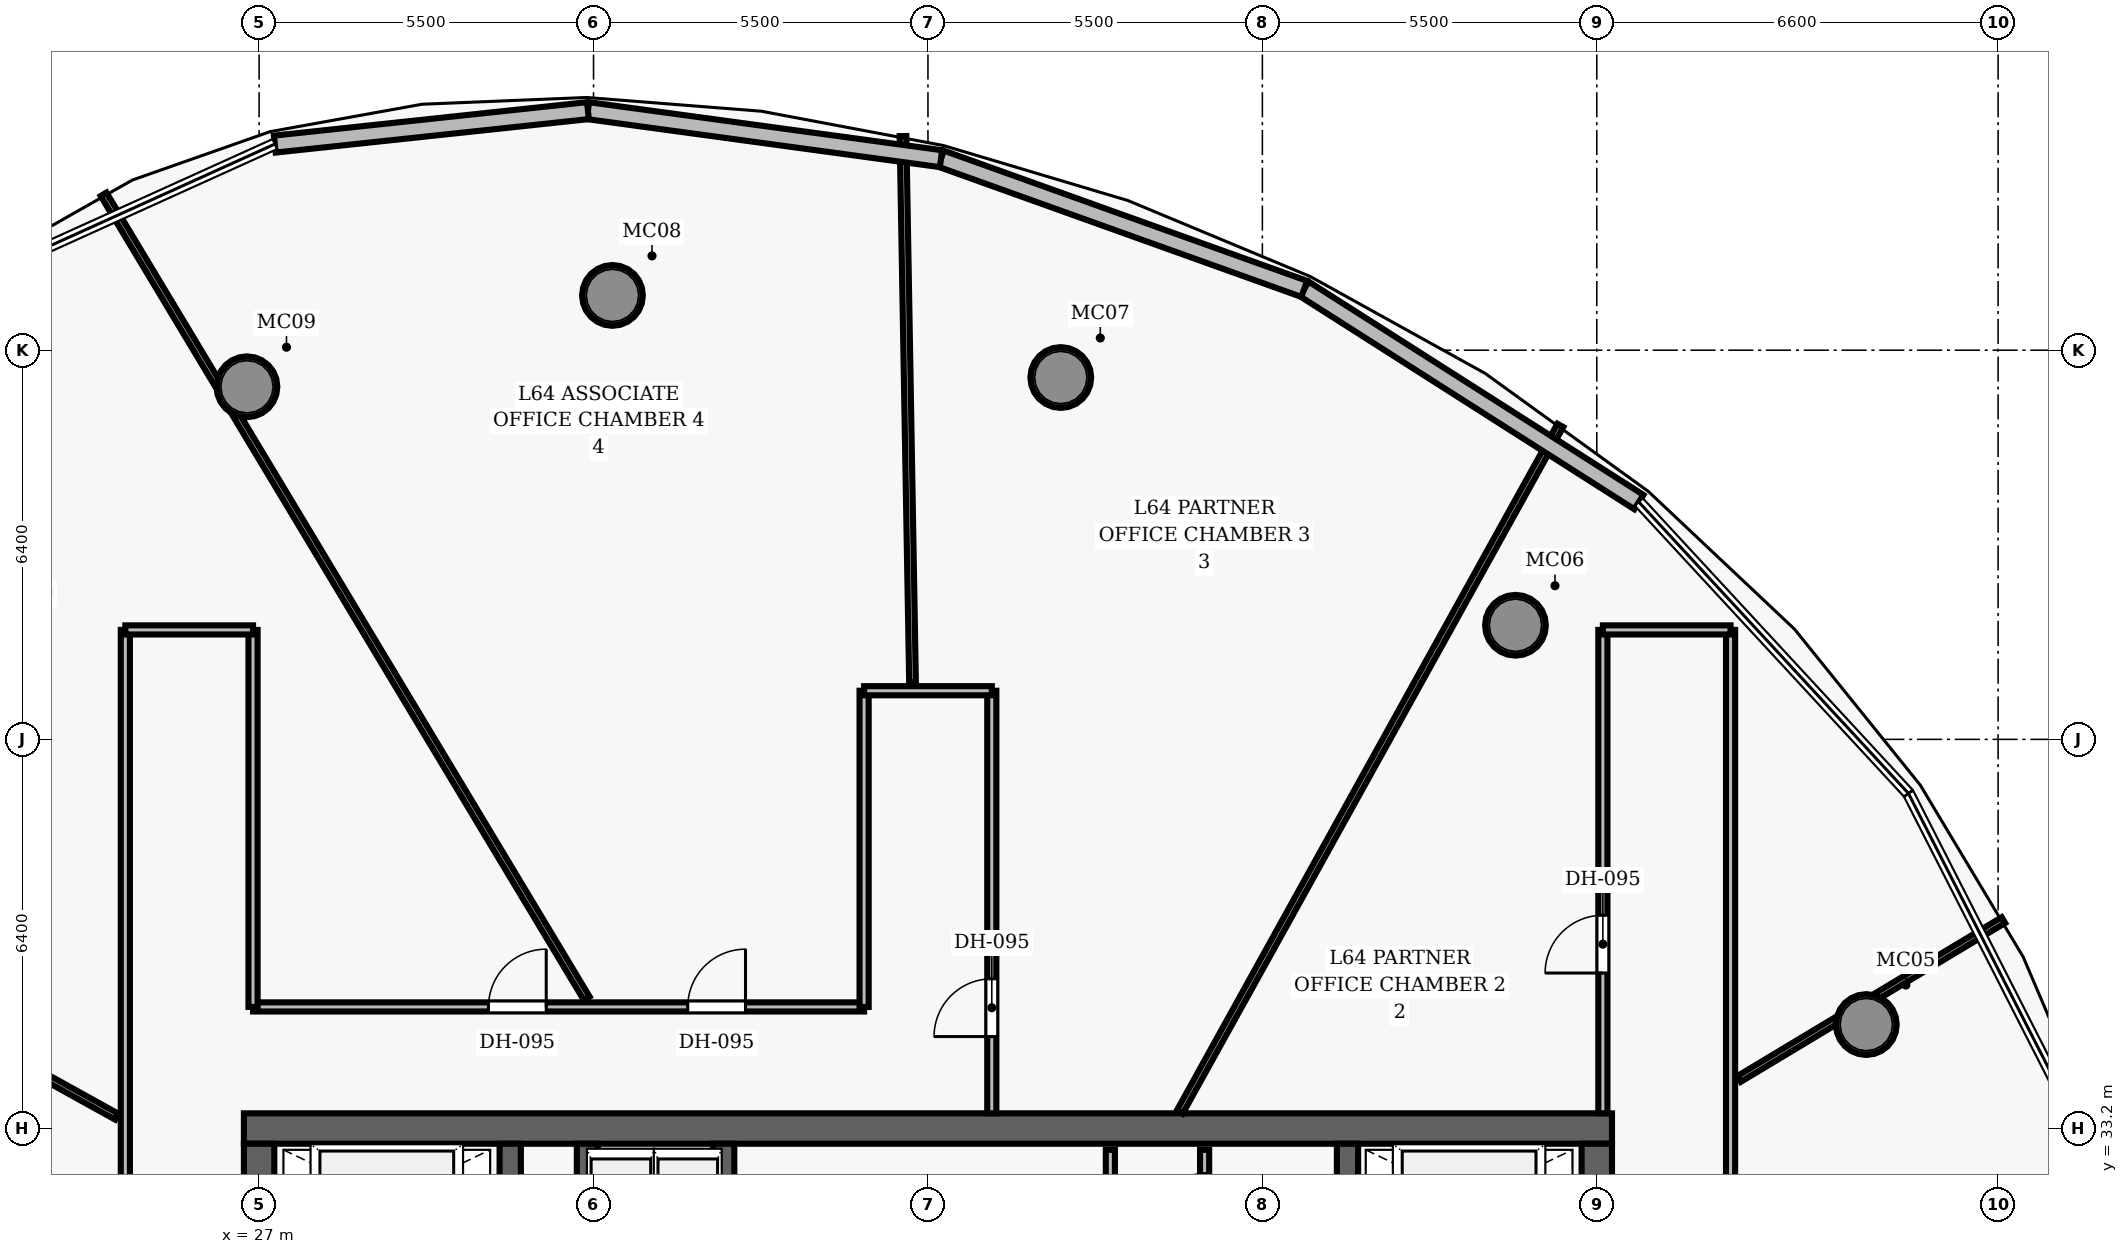
"""IFC4 building model, lengths in metres.
Left out: names, types, materials, properties, quantities, classifications, styles, units other than length and angle.
Written with IfcOpenShell. Run it as: python <this file> out.ifc"""

import sys

from ifc_helpers import new_model, si_unit, direction, frame, frame_2d, origin, origin_2d, place, context, subcontext, project, spatial, rectangle, hollow_circle, extrude, element, fill, save


model = new_model("IFC4")
c1 = context("Model", 3, precision=1e-05, world=origin(), true_north=direction((0.0, 1.0)))
c2 = subcontext(c1, "Body", "Model", "MODEL_VIEW")
j1 = project(units=[si_unit("LENGTHUNIT", "METRE"), si_unit("PLANEANGLEUNIT", "RADIAN")], contexts=[c1])
p1 = place(None, origin())
s1 = spatial("IfcSite", under=j1, at=p1, CompositionType="ELEMENT")
p2 = place(p1, origin())
s2 = spatial("IfcBuilding", under=s1, at=p2, CompositionType="ELEMENT")
p3 = place(p2, frame((0.0, 0.0, 253.6)))
s3 = spatial("IfcBuildingStorey", under=s2, at=p3, CompositionType="ELEMENT", Elevation=253.6)
p4 = place(p3, frame((26.75, 33.2, 0.0), z_axis=(0.0, 0.0, 1.0), x_axis=(1.0, 0.0, 0.0)))
e1 = element("IfcWall", 1, at=p4, inside=s3, PredefinedType="SHEAR", context=c2, shape_type="SweptSolid", body=[
    extrude(rectangle(XDim=22.5, YDim=0.5, at=frame_2d((11.25, 0.0))), origin(), (0.0, 0.0, 1.0), 3.85),
])
p5 = place(p3, frame((27.0, 19.05, 0.0), z_axis=(0.0, 0.0, 1.0), x_axis=(0.0, 1.0, 0.0)))
e2 = element("IfcWall", 2, at=p5, inside=s3, PredefinedType="SHEAR", context=c2, shape_type="SweptSolid", body=[
    extrude(rectangle(XDim=13.9, YDim=0.5, at=frame_2d((6.95, 0.0))), origin(), (0.0, 0.0, 1.0), 3.85),
])
p6 = place(p5, frame((8.2, 0.0, 0.0)))
e3 = element("IfcOpeningElement", 3, at=p6, cuts=e2, PredefinedType="OPENING", context=c2, shape_type="SweptSolid", body=[
    extrude(rectangle(XDim=1.05, YDim=2.15, at=frame_2d((0.525, 1.075))), frame((0.0, 0.26, 0.0), z_axis=(0.0, -1.0, 0.0), x_axis=(1.0, 0.0, 0.0)), (0.0, 0.0, 1.0), 0.52),
])
p7 = place(p3, frame((49.0, 19.05, 0.0), z_axis=(0.0, 0.0, 1.0), x_axis=(0.0, 1.0, 0.0)))
e4 = element("IfcWall", 4, at=p7, inside=s3, PredefinedType="SHEAR", context=c2, shape_type="SweptSolid", body=[
    extrude(rectangle(XDim=13.9, YDim=0.5, at=frame_2d((6.95, 0.0))), origin(), (0.0, 0.0, 1.0), 3.85),
])
p8 = place(p7, frame((8.2, 0.0, 0.0)))
e5 = element("IfcOpeningElement", 5, at=p8, cuts=e4, PredefinedType="OPENING", context=c2, shape_type="SweptSolid", body=[
    extrude(rectangle(XDim=1.05, YDim=2.15, at=frame_2d((0.525, 1.075))), frame((0.0, 0.26, 0.0), z_axis=(0.0, -1.0, 0.0), x_axis=(1.0, 0.0, 0.0)), (0.0, 0.0, 1.0), 0.52),
])
for number, where, z_axis, x_axis in (
    (6, (31.13, 19.05, 0.0), (0.0, 0.0, 1.0), (0.0, 1.0, 0.0)),
    (7, (44.9, 19.05, 0.0), (0.0, 0.0, 1.0), (0.0, 1.0, 0.0)),
):
    element("IfcWall", number, at=place(p3, frame(where, z_axis=z_axis, x_axis=x_axis)), inside=s3, PredefinedType="SHEAR", context=c2, shape_type="SweptSolid", body=[
        extrude(rectangle(XDim=13.9, YDim=0.35, at=frame_2d((6.95, 0.0))), origin(), (0.0, 0.0, 1.0), 3.85),
    ])
for number, where, z_axis, x_axis in (
    (8, (53.433, 34.91, 0.0), (0.0, 0.0, 1.0), (1.0, 0.0, 0.0)),
    (9, (47.662, 41.477, 0.0), (0.0, 0.0, 1.0), (1.0, 0.0, 0.0)),
    (10, (40.185, 45.551, 0.0), (0.0, 0.0, 1.0), (1.0, 0.0, 0.0)),
    (11, (32.812, 46.901, 0.0), (0.0, 0.0, 1.0), (1.0, 0.0, 0.0)),
    (12, (26.8, 45.399, 0.0), (0.0, 0.0, 1.0), (1.0, 0.0, 0.0)),
):
    element("IfcColumn", number, at=place(p3, frame(where, z_axis=z_axis, x_axis=x_axis)), inside=s3, PredefinedType="COLUMN", context=c2, shape_type="SweptSolid", body=[
        extrude(hollow_circle(Radius=0.5, WallThickness=0.045, at=origin_2d()), origin(), (0.0, 0.0, 1.0), 3.85),
    ])
p9 = place(p3, frame((34.64, 26.69, 0.0), z_axis=(0.0, 0.0, 1.0), x_axis=(0.0, 1.0, 0.0)))
e13 = element("IfcWall", 13, at=p9, inside=s3, PredefinedType="SHEAR", context=c2, shape_type="SweptSolid", body=[
    extrude(rectangle(XDim=6.26, YDim=0.35, at=frame_2d((3.13, 0.0))), origin(), (0.0, 0.0, 1.0), 3.85),
])
p10 = place(p9, frame((0.85, 0.0, 0.0)))
e14 = element("IfcOpeningElement", 14, at=p10, cuts=e13, PredefinedType="OPENING", context=c2, shape_type="SweptSolid", body=[
    extrude(rectangle(XDim=1.05, YDim=2.15, at=frame_2d((0.525, 1.075))), frame((0.0, 0.185, 0.0), z_axis=(0.0, -1.0, 0.0), x_axis=(1.0, 0.0, 0.0)), (0.0, 0.0, 1.0), 0.37),
])
p11 = place(p3, frame((32.4, 30.22, 0.0), z_axis=(0.0, 0.0, 1.0), x_axis=(0.0, 1.0, 0.0)))
e15 = element("IfcWall", 15, at=p11, inside=s3, PredefinedType="SHEAR", context=c2, shape_type="SweptSolid", body=[
    extrude(rectangle(XDim=2.73, YDim=0.35, at=frame_2d((1.365, 0.0))), origin(), (0.0, 0.0, 1.0), 3.04),
])
p12 = place(p3, frame((41.0, 28.95, 0.0), z_axis=(0.0, 0.0, 1.0), x_axis=(0.0, 1.0, 0.0)))
e16 = element("IfcWall", 16, at=p12, inside=s3, PredefinedType="PARTITIONING", context=c2, shape_type="SweptSolid", body=[
    extrude(rectangle(XDim=3.9, YDim=0.15, at=frame_2d((1.95, 0.0))), origin(), (0.0, 0.0, 1.0), 3.04),
])
p13 = place(p12, frame((0.7, 0.0, 0.0)))
e17 = element("IfcOpeningElement", 17, at=p13, cuts=e16, PredefinedType="OPENING", context=c2, shape_type="SweptSolid", body=[
    extrude(rectangle(XDim=0.85, YDim=2.1, at=frame_2d((0.425, 1.05))), frame((0.0, 0.085, 0.0), z_axis=(0.0, -1.0, 0.0), x_axis=(1.0, 0.0, 0.0)), (0.0, 0.0, 1.0), 0.17),
])
p14 = place(p3, frame((42.55, 28.1, 0.0), z_axis=(0.0, 0.0, 1.0), x_axis=(0.0, 1.0, 0.0)))
e18 = element("IfcWall", 18, at=p14, inside=s3, PredefinedType="PARTITIONING", context=c2, shape_type="SweptSolid", body=[
    extrude(rectangle(XDim=4.75, YDim=0.15, at=frame_2d((2.375, 0.0))), origin(), (0.0, 0.0, 1.0), 3.04),
])
p15 = place(p14, frame((0.35, 0.0, 0.0)))
e19 = element("IfcOpeningElement", 19, at=p15, cuts=e18, PredefinedType="OPENING", context=c2, shape_type="SweptSolid", body=[
    extrude(rectangle(XDim=0.85, YDim=2.1, at=frame_2d((0.425, 1.05))), frame((0.0, 0.085, 0.0), z_axis=(0.0, -1.0, 0.0), x_axis=(1.0, 0.0, 0.0)), (0.0, 0.0, 1.0), 0.17),
])
p16 = place(p14, frame((1.93, 0.0, 0.0)))
e20 = element("IfcOpeningElement", 20, at=p16, cuts=e18, PredefinedType="OPENING", context=c2, shape_type="SweptSolid", body=[
    extrude(rectangle(XDim=0.85, YDim=2.1, at=frame_2d((0.425, 1.05))), frame((0.0, 0.085, 0.0), z_axis=(0.0, -1.0, 0.0), x_axis=(1.0, 0.0, 0.0)), (0.0, 0.0, 1.0), 0.17),
])
p17 = place(p14, frame((3.51, 0.0, 0.0)))
e21 = element("IfcOpeningElement", 21, at=p17, cuts=e18, PredefinedType="OPENING", context=c2, shape_type="SweptSolid", body=[
    extrude(rectangle(XDim=0.85, YDim=2.1, at=frame_2d((0.425, 1.05))), frame((0.0, 0.085, 0.0), z_axis=(0.0, -1.0, 0.0), x_axis=(1.0, 0.0, 0.0)), (0.0, 0.0, 1.0), 0.17),
])
p18 = place(p3, frame((26.9, 35.2, 0.0), z_axis=(0.0, 0.0, 1.0), x_axis=(1.0, 0.0, 0.0)))
e22 = element("IfcWall", 22, at=p18, inside=s3, PredefinedType="PARTITIONING", context=c2, shape_type="SweptSolid", body=[
    extrude(rectangle(XDim=10.05, YDim=0.15, at=frame_2d((5.025, 0.0))), origin(), (0.0, 0.0, 1.0), 3.04),
])
p19 = place(p18, frame((7.149, 0.0, 0.0)))
e23 = element("IfcOpeningElement", 23, at=p19, cuts=e22, PredefinedType="OPENING", context=c2, shape_type="SweptSolid", body=[
    extrude(rectangle(XDim=0.95, YDim=2.15, at=frame_2d((0.475, 1.075))), frame((0.0, 0.085, 0.0), z_axis=(0.0, -1.0, 0.0), x_axis=(1.0, 0.0, 0.0)), (0.0, 0.0, 1.0), 0.17),
])
p20 = place(p18, frame((3.872, 0.0, 0.0)))
e24 = element("IfcOpeningElement", 24, at=p20, cuts=e22, PredefinedType="OPENING", context=c2, shape_type="SweptSolid", body=[
    extrude(rectangle(XDim=0.95, YDim=2.15, at=frame_2d((0.475, 1.075))), frame((0.0, 0.085, 0.0), z_axis=(0.0, -1.0, 0.0), x_axis=(1.0, 0.0, 0.0)), (0.0, 0.0, 1.0), 0.17),
])
p21 = place(p3, frame((24.8, 11.317, 0.0), z_axis=(0.0, 0.0, 1.0), x_axis=(0.0, 1.0, 0.0)))
e25 = element("IfcWall", 25, at=p21, inside=s3, PredefinedType="PARTITIONING", context=c2, shape_type="SweptSolid", body=[
    extrude(rectangle(XDim=30.083, YDim=0.15, at=frame_2d((15.042, 0.0))), origin(), (0.0, 0.0, 1.0), 3.04),
])
p22 = place(p21, frame((17.785, 0.0, 0.0)))
e26 = element("IfcOpeningElement", 26, at=p22, cuts=e25, PredefinedType="OPENING", context=c2, shape_type="SweptSolid", body=[
    extrude(rectangle(XDim=0.95, YDim=2.15, at=frame_2d((0.475, 1.075))), frame((0.0, 0.085, 0.0), z_axis=(0.0, -1.0, 0.0), x_axis=(1.0, 0.0, 0.0)), (0.0, 0.0, 1.0), 0.17),
])
p23 = place(p21, frame((11.343, 0.0, 0.0)))
e27 = element("IfcOpeningElement", 27, at=p23, cuts=e25, PredefinedType="OPENING", context=c2, shape_type="SweptSolid", body=[
    extrude(rectangle(XDim=0.95, YDim=2.15, at=frame_2d((0.475, 1.075))), frame((0.0, 0.085, 0.0), z_axis=(0.0, -1.0, 0.0), x_axis=(1.0, 0.0, 0.0)), (0.0, 0.0, 1.0), 0.17),
])
p24 = place(p3, frame((26.9, 35.2, 0.0), z_axis=(0.0, 0.0, 1.0), x_axis=(0.0, 1.0, 0.0)))
e28 = element("IfcWall", 28, at=p24, inside=s3, PredefinedType="PARTITIONING", context=c2, shape_type="SweptSolid", body=[
    extrude(rectangle(XDim=6.2, YDim=0.15, at=frame_2d((3.1, 0.0))), origin(), (0.0, 0.0, 1.0), 3.04),
])
p25 = place(p3, frame((24.8, 41.4, 0.0), z_axis=(0.0, 0.0, 1.0), x_axis=(1.0, 0.0, 0.0)))
e29 = element("IfcWall", 29, at=p25, inside=s3, PredefinedType="PARTITIONING", context=c2, shape_type="SweptSolid", body=[
    extrude(rectangle(XDim=2.1, YDim=0.15, at=frame_2d((1.05, 0.0))), origin(), (0.0, 0.0, 1.0), 3.04),
])
p26 = place(p3, frame((51.2, 10.6, 0.0), z_axis=(0.0, 0.0, 1.0), x_axis=(0.0, 1.0, 0.0)))
e30 = element("IfcWall", 30, at=p26, inside=s3, PredefinedType="PARTITIONING", context=c2, shape_type="SweptSolid", body=[
    extrude(rectangle(XDim=30.8, YDim=0.15, at=frame_2d((15.4, 0.0))), origin(), (0.0, 0.0, 1.0), 3.04),
])
p27 = place(p26, frame((17.79, 0.0, 0.0)))
e31 = element("IfcOpeningElement", 31, at=p27, cuts=e30, PredefinedType="OPENING", context=c2, shape_type="SweptSolid", body=[
    extrude(rectangle(XDim=0.95, YDim=2.15, at=frame_2d((0.475, 1.075))), frame((0.0, 0.085, 0.0), z_axis=(0.0, -1.0, 0.0), x_axis=(1.0, 0.0, 0.0)), (0.0, 0.0, 1.0), 0.17),
])
p28 = place(p26, frame((11.348, 0.0, 0.0)))
e32 = element("IfcOpeningElement", 32, at=p28, cuts=e30, PredefinedType="OPENING", context=c2, shape_type="SweptSolid", body=[
    extrude(rectangle(XDim=0.95, YDim=2.15, at=frame_2d((0.475, 1.075))), frame((0.0, 0.085, 0.0), z_axis=(0.0, -1.0, 0.0), x_axis=(1.0, 0.0, 0.0)), (0.0, 0.0, 1.0), 0.17),
])
p29 = place(p3, frame((49.1, 33.45, 0.0), z_axis=(0.0, 0.0, 1.0), x_axis=(0.0, 1.0, 0.0)))
e33 = element("IfcWall", 33, at=p29, inside=s3, PredefinedType="PARTITIONING", context=c2, shape_type="SweptSolid", body=[
    extrude(rectangle(XDim=7.95, YDim=0.15, at=frame_2d((3.975, 0.0))), origin(), (0.0, 0.0, 1.0), 3.04),
])
p30 = place(p29, frame((2.308, 0.0, 0.0)))
e34 = element("IfcOpeningElement", 34, at=p30, cuts=e33, PredefinedType="OPENING", context=c2, shape_type="SweptSolid", body=[
    extrude(rectangle(XDim=0.95, YDim=2.15, at=frame_2d((0.475, 1.075))), frame((0.0, 0.085, 0.0), z_axis=(0.0, -1.0, 0.0), x_axis=(1.0, 0.0, 0.0)), (0.0, 0.0, 1.0), 0.17),
])
p31 = place(p3, frame((49.1, 41.4, 0.0), z_axis=(0.0, 0.0, 1.0), x_axis=(1.0, 0.0, 0.0)))
e35 = element("IfcWall", 35, at=p31, inside=s3, PredefinedType="PARTITIONING", context=c2, shape_type="SweptSolid", body=[
    extrude(rectangle(XDim=2.1, YDim=0.15, at=frame_2d((1.05, 0.0))), origin(), (0.0, 0.0, 1.0), 3.04),
])
p32 = place(p3, frame((36.95, 35.2, 0.0), z_axis=(0.0, 0.0, 1.0), x_axis=(0.0, 1.0, 0.0)))
e36 = element("IfcWall", 36, at=p32, inside=s3, PredefinedType="PARTITIONING", context=c2, shape_type="SweptSolid", body=[
    extrude(rectangle(XDim=5.2, YDim=0.15, at=frame_2d((2.6, 0.0))), origin(), (0.0, 0.0, 1.0), 3.04),
])
p33 = place(p3, frame((39.05, 33.45, 0.0), z_axis=(0.0, 0.0, 1.0), x_axis=(0.0, 1.0, 0.0)))
e37 = element("IfcWall", 37, at=p33, inside=s3, PredefinedType="PARTITIONING", context=c2, shape_type="SweptSolid", body=[
    extrude(rectangle(XDim=6.95, YDim=0.15, at=frame_2d((3.475, 0.0))), origin(), (0.0, 0.0, 1.0), 3.04),
])
p34 = place(p33, frame((1.262, 0.0, 0.0)))
e38 = element("IfcOpeningElement", 38, at=p34, cuts=e37, PredefinedType="OPENING", context=c2, shape_type="SweptSolid", body=[
    extrude(rectangle(XDim=0.95, YDim=2.15, at=frame_2d((0.475, 1.075))), frame((0.0, 0.085, 0.0), z_axis=(0.0, -1.0, 0.0), x_axis=(1.0, 0.0, 0.0)), (0.0, 0.0, 1.0), 0.17),
])
p35 = place(p3, frame((36.95, 40.4, 0.0), z_axis=(0.0, 0.0, 1.0), x_axis=(1.0, 0.0, 0.0)))
e39 = element("IfcWall", 39, at=p35, inside=s3, PredefinedType="PARTITIONING", context=c2, shape_type="SweptSolid", body=[
    extrude(rectangle(XDim=2.1, YDim=0.15, at=frame_2d((1.05, 0.0))), origin(), (0.0, 0.0, 1.0), 3.04),
])
p36 = place(p3, frame((51.34, 34.015, 0.0), z_axis=(0.0, 0.0, 1.0), x_axis=(0.857144436963, 0.515076124649, 0.0)))
e40 = element("IfcWall", 40, at=p36, inside=s3, PredefinedType="PARTITIONING", context=c2, shape_type="SweptSolid", body=[
    extrude(rectangle(XDim=5.072, YDim=0.11, at=frame_2d((2.536, 0.0))), origin(), (0.0, 0.0, 1.0), 3.04),
])
p37 = place(p3, frame((42.141, 33.47, 0.0), z_axis=(0.0, 0.0, 1.0), x_axis=(0.4848063211, 0.874621535878, 0.0)))
e41 = element("IfcWall", 41, at=p37, inside=s3, PredefinedType="PARTITIONING", context=c2, shape_type="SweptSolid", body=[
    extrude(rectangle(XDim=12.912, YDim=0.11, at=frame_2d((6.456, 0.0))), origin(), (0.0, 0.0, 1.0), 3.04),
])
p38 = place(p3, frame((37.746, 40.54, 0.0), z_axis=(0.0, 0.0, 1.0), x_axis=(-0.017448211892, 0.999847768364, 0.0)))
e42 = element("IfcWall", 42, at=p38, inside=s3, PredefinedType="PARTITIONING", context=c2, shape_type="SweptSolid", body=[
    extrude(rectangle(XDim=8.983, YDim=0.11, at=frame_2d((4.492, 0.0))), origin(), (0.0, 0.0, 1.0), 3.04),
])
p39 = place(p3, frame((32.388, 35.34, 0.0), z_axis=(0.0, 0.0, 1.0), x_axis=(-0.515035560083, 0.857168811758, 0.0)))
e43 = element("IfcWall", 43, at=p39, inside=s3, PredefinedType="PARTITIONING", context=c2, shape_type="SweptSolid", body=[
    extrude(rectangle(XDim=15.428, YDim=0.11, at=frame_2d((7.714, 0.0))), origin(), (0.0, 0.0, 1.0), 3.04),
])
p40 = place(p3, frame((24.66, 33.395, 0.0), z_axis=(0.0, 0.0, 1.0), x_axis=(-0.874629144462, 0.484792594475, 0.0)))
e44 = element("IfcWall", 44, at=p40, inside=s3, PredefinedType="PARTITIONING", context=c2, shape_type="SweptSolid", body=[
    extrude(rectangle(XDim=9.071, YDim=0.11, at=frame_2d((4.535, 0.0))), origin(), (0.0, 0.0, 1.0), 3.04),
])
p41 = place(p3, frame((44.188, 47.009, 0.0), z_axis=(0.0, 0.0, 1.0), x_axis=(0.843459639853, -0.537192550152, 0.0)))
e45 = element("IfcWall", 45, at=p41, inside=s3, PredefinedType="SOLIDWALL", context=c2, shape_type="SweptSolid", body=[
    extrude(rectangle(XDim=6.526, YDim=0.28, at=frame_2d((3.263, 0.0))), origin(), (0.0, 0.0, 1.0), 3.625),
])
p42 = place(p3, frame((38.215, 49.15, 0.0), z_axis=(0.0, 0.0, 1.0), x_axis=(0.941345169533, -0.337445213031, 0.0)))
e46 = element("IfcWall", 46, at=p42, inside=s3, PredefinedType="SOLIDWALL", context=c2, shape_type="SweptSolid", body=[
    extrude(rectangle(XDim=6.345, YDim=0.28, at=frame_2d((3.172, 0.0))), origin(), (0.0, 0.0, 1.0), 3.625),
])
p43 = place(p3, frame((32.408, 49.939, 0.0), z_axis=(0.0, 0.0, 1.0), x_axis=(0.990881813427, -0.134733929727, 0.0)))
e47 = element("IfcWall", 47, at=p43, inside=s3, PredefinedType="SOLIDWALL", context=c2, shape_type="SweptSolid", body=[
    extrude(rectangle(XDim=5.86, YDim=0.28, at=frame_2d((2.93, 0.0))), origin(), (0.0, 0.0, 1.0), 3.625),
])
p44 = place(p3, frame((27.258, 49.389, 0.0), z_axis=(0.0, 0.0, 1.0), x_axis=(0.994349385692, 0.10615695537, 0.0)))
e48 = element("IfcWall", 48, at=p44, inside=s3, PredefinedType="SOLIDWALL", context=c2, shape_type="SweptSolid", body=[
    extrude(rectangle(XDim=5.179, YDim=0.28, at=frame_2d((2.59, 0.0))), origin(), (0.0, 0.0, 1.0), 3.625),
])
p45 = place(p17, origin())
e49 = element("IfcDoor", 49, at=p45, inside=s3, OperationType="SINGLE_SWING_LEFT", PredefinedType="DOOR", context=c2, shape_type="SweptSolid", body=[
    extrude(rectangle(XDim=0.85, YDim=2.1, at=frame_2d((0.425, 1.05))), frame((0.0, 0.025, 0.0), z_axis=(0.0, -1.0, 0.0), x_axis=(1.0, 0.0, 0.0)), (0.0, 0.0, 1.0), 0.05),
])
fill(e21, e49)
p46 = place(p30, origin())
e50 = element("IfcDoor", 50, at=p46, inside=s3, OperationType="SINGLE_SWING_LEFT", PredefinedType="DOOR", context=c2, shape_type="SweptSolid", body=[
    extrude(rectangle(XDim=0.95, YDim=2.15, at=frame_2d((0.475, 1.075))), frame((0.0, 0.025, 0.0), z_axis=(0.0, -1.0, 0.0), x_axis=(1.0, 0.0, 0.0)), (0.0, 0.0, 1.0), 0.05),
])
fill(e34, e50)
p47 = place(p34, origin())
e51 = element("IfcDoor", 51, at=p47, inside=s3, OperationType="SINGLE_SWING_LEFT", PredefinedType="DOOR", context=c2, shape_type="SweptSolid", body=[
    extrude(rectangle(XDim=0.95, YDim=2.15, at=frame_2d((0.475, 1.075))), frame((0.0, 0.025, 0.0), z_axis=(0.0, -1.0, 0.0), x_axis=(1.0, 0.0, 0.0)), (0.0, 0.0, 1.0), 0.05),
])
fill(e38, e51)
p48 = place(p19, origin())
e52 = element("IfcDoor", 52, at=p48, inside=s3, OperationType="SINGLE_SWING_RIGHT", PredefinedType="DOOR", context=c2, shape_type="SweptSolid", body=[
    extrude(rectangle(XDim=0.95, YDim=2.15, at=frame_2d((0.475, 1.075))), frame((0.0, 0.025, 0.0), z_axis=(0.0, -1.0, 0.0), x_axis=(1.0, 0.0, 0.0)), (0.0, 0.0, 1.0), 0.05),
])
fill(e23, e52)
p49 = place(p20, origin())
e53 = element("IfcDoor", 53, at=p49, inside=s3, OperationType="SINGLE_SWING_RIGHT", PredefinedType="DOOR", context=c2, shape_type="SweptSolid", body=[
    extrude(rectangle(XDim=0.95, YDim=2.15, at=frame_2d((0.475, 1.075))), frame((0.0, 0.025, 0.0), z_axis=(0.0, -1.0, 0.0), x_axis=(1.0, 0.0, 0.0)), (0.0, 0.0, 1.0), 0.05),
])
fill(e24, e53)
save(model, sys.argv[1])
